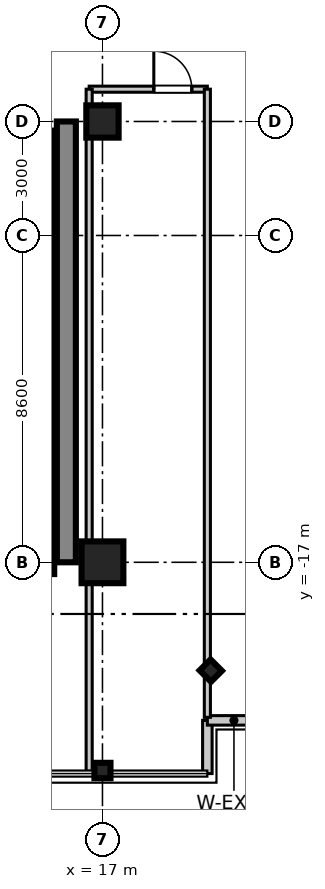
"""IFC4 building model, lengths in metres.
Left out: names, types, materials, properties, quantities, classifications, styles, units other than length and angle.
Written with IfcOpenShell. Run it as: python <this file> out.ifc"""

import sys

from ifc_helpers import new_model, si_unit, direction, frame, frame_2d, origin, origin_2d, place, context, subcontext, project, spatial, rectangle, i_section, extrude, source, transform, mapped, element, fill, save


model = new_model("IFC4")
c1 = context("Model", 3, precision=1e-05, world=origin(), true_north=direction((0.0, 1.0)))
c2 = subcontext(c1, "Body", "Model", "MODEL_VIEW")
j1 = project(units=[si_unit("LENGTHUNIT", "METRE"), si_unit("PLANEANGLEUNIT", "RADIAN")], contexts=[c1])
p1 = place(None, origin())
s1 = spatial("IfcSite", under=j1, at=p1, CompositionType="ELEMENT")
p2 = place(p1, origin())
s2 = spatial("IfcBuilding", under=s1, at=p2, CompositionType="ELEMENT")
p3 = place(p2, frame((0.0, 0.0, 178.2)))
s3 = spatial("IfcBuildingStorey", under=s2, at=p3, CompositionType="ELEMENT", Elevation=178.2)
m1 = source(origin(), c2, "Body", "SweptSolid", [
    extrude(rectangle(XDim=1.1, YDim=1.1, at=origin_2d()), origin(), (0.0, 0.0, 1.0), 3.605),
])
p4 = place(p3, frame((17.0, -17.0, 0.0), z_axis=(0.0, 0.0, 1.0), x_axis=(1.0, 0.0, 0.0)))
e1 = element("IfcColumn", 1, at=p4, inside=s3, PredefinedType="COLUMN", context=c2, shape_type="MappedRepresentation", body=[
    mapped(m1, transform((0.0, 0.0, 0.0), scale=1.0)),
])
m2 = source(origin(), c2, "Body", "SweptSolid", [
    extrude(rectangle(XDim=0.85, YDim=0.85, at=origin_2d()), origin(), (0.0, 0.0, 1.0), 3.605),
])
p5 = place(p3, frame((17.0, -5.4, 0.0), z_axis=(0.0, 0.0, 1.0), x_axis=(1.0, 0.0, 0.0)))
e2 = element("IfcColumn", 2, at=p5, inside=s3, PredefinedType="PILASTER", context=c2, shape_type="MappedRepresentation", body=[
    mapped(m2, transform((0.0, 0.0, 0.0), scale=1.0)),
])
m3 = source(origin(), c2, "Body", "SweptSolid", [
    extrude(i_section(OverallWidth=0.406, OverallDepth=0.422, WebThickness=0.019, FlangeThickness=0.03, at=origin_2d()), origin(), (0.0, 0.0, 1.0), 3.605),
])
for number, where, z_axis, x_axis in (
    (3, (17.0, -22.48, 0.0), (0.0, 0.0, 1.0), (0.0, 1.0, 0.0)),
    (4, (19.85, -19.85, 0.0), (0.0, 0.0, 1.0), (0.707, 0.707, 0.0)),
):
    element("IfcColumn", number, at=place(p3, frame(where, z_axis=z_axis, x_axis=x_axis)), inside=s3, PredefinedType="COLUMN", context=c2, shape_type="MappedRepresentation", body=[
        mapped(m3, transform((0.0, 0.0, 0.0), scale=1.0)),
    ])
m4 = source(origin(), c2, "Body", "SweptSolid", [
    extrude(rectangle(XDim=11.6, YDim=0.5, at=frame_2d((5.8, 0.0))), origin(), (0.0, 0.0, 1.0), 3.39),
])
p6 = place(p3, frame((16.05, -17.0, 0.0), z_axis=(0.0, 0.0, 1.0), x_axis=(0.0, 1.0, 0.0)))
e5 = element("IfcWall", 5, at=p6, inside=s3, PredefinedType="SHEAR", context=c2, shape_type="MappedRepresentation", body=[
    mapped(m4, transform((0.0, 0.0, 0.0), scale=1.0)),
])
m5 = source(origin(), c2, "Body", "SweptSolid", [
    extrude(rectangle(XDim=2.36, YDim=0.22, at=frame_2d((1.18, 0.0))), origin(), (0.0, 0.0, 1.0), 3.39),
])
p7 = place(p3, frame((15.62, -8.0, 0.0), z_axis=(0.0, 0.0, 1.0), x_axis=(0.0, 1.0, 0.0)))
e6 = element("IfcWall", 6, at=p7, inside=s3, PredefinedType="SHEAR", context=c2, shape_type="MappedRepresentation", body=[
    mapped(m5, transform((0.0, 0.0, 0.0), scale=1.0)),
])
m6 = source(origin(), c2, "Body", "SweptSolid", [
    extrude(rectangle(XDim=2.2, YDim=0.22, at=frame_2d((1.1, 0.0))), origin(), (0.0, 0.0, 1.0), 3.39),
])
for number, where, z_axis, x_axis in (
    (7, (15.62, -10.2, 0.0), (0.0, 0.0, 1.0), (0.0, 1.0, 0.0)),
    (8, (15.62, -12.4, 0.0), (0.0, 0.0, 1.0), (0.0, 1.0, 0.0)),
):
    element("IfcWall", number, at=place(p3, frame(where, z_axis=z_axis, x_axis=x_axis)), inside=s3, PredefinedType="SHEAR", context=c2, shape_type="MappedRepresentation", body=[
        mapped(m6, transform((0.0, 0.0, 0.0), scale=1.0)),
    ])
m7 = source(origin(), c2, "Body", "SweptSolid", [
    extrude(rectangle(XDim=2.3, YDim=0.22, at=frame_2d((1.15, 0.0))), origin(), (0.0, 0.0, 1.0), 3.39),
])
p8 = place(p3, frame((15.62, -14.7, 0.0), z_axis=(0.0, 0.0, 1.0), x_axis=(0.0, 1.0, 0.0)))
e9 = element("IfcWall", 9, at=p8, inside=s3, PredefinedType="SHEAR", context=c2, shape_type="MappedRepresentation", body=[
    mapped(m7, transform((0.0, 0.0, 0.0), scale=1.0)),
])
m8 = source(origin(), c2, "Body", "SweptSolid", [
    extrude(rectangle(XDim=2.61, YDim=0.22, at=frame_2d((1.305, 0.0))), origin(), (0.0, 0.0, 1.0), 3.39),
])
p9 = place(p3, frame((15.62, -17.31, 0.0), z_axis=(0.0, 0.0, 1.0), x_axis=(0.0, 1.0, 0.0)))
e10 = element("IfcWall", 10, at=p9, inside=s3, PredefinedType="SHEAR", context=c2, shape_type="MappedRepresentation", body=[
    mapped(m8, transform((0.0, 0.0, 0.0), scale=1.0)),
])
m9 = source(origin(), c2, "Body", "SweptSolid", [
    extrude(rectangle(XDim=1.4, YDim=0.25, at=frame_2d((0.7, 0.0))), origin(), (0.0, 0.0, 1.0), 3.39),
])
p10 = place(p3, frame((19.76, -22.56, 0.0), z_axis=(0.0, 0.0, 1.0), x_axis=(0.0, 1.0, 0.0)))
e11 = element("IfcWall", 11, at=p10, inside=s3, PredefinedType="STANDARD", context=c2, shape_type="MappedRepresentation", body=[
    mapped(m9, transform((0.0, 0.0, 0.0), scale=1.0)),
])
m10 = source(origin(), c2, "Body", "SweptSolid", [
    extrude(rectangle(XDim=1.4, YDim=0.25, at=frame_2d((0.7, 0.0))), origin(), (0.0, 0.0, 1.0), 3.39),
])
p11 = place(p3, frame((19.76, -21.16, 0.0), z_axis=(0.0, 0.0, 1.0), x_axis=(1.0, 0.0, 0.0)))
e12 = element("IfcWall", 12, at=p11, inside=s3, PredefinedType="STANDARD", context=c2, shape_type="MappedRepresentation", body=[
    mapped(m10, transform((0.0, 0.0, 0.0), scale=1.0)),
])
m11 = source(origin(), c2, "Body", "SweptSolid", [
    extrude(rectangle(XDim=3.11, YDim=0.16, at=frame_2d((1.555, 0.0))), origin(), (0.0, 0.0, 1.0), 2.73),
])
p12 = place(p3, frame((16.65, -4.55, 0.0), z_axis=(0.0, 0.0, 1.0), x_axis=(1.0, 0.0, 0.0)))
e13 = element("IfcWall", 13, at=p12, inside=s3, PredefinedType="PARTITIONING", context=c2, shape_type="MappedRepresentation", body=[
    mapped(m11, transform((0.0, 0.0, 0.0), scale=1.0)),
])
p13 = place(p12, frame((1.701, 0.0, 0.0)))
e14 = element("IfcOpeningElement", 14, at=p13, cuts=e13, PredefinedType="OPENING", context=c2, shape_type="SweptSolid", body=[
    extrude(rectangle(XDim=1.0, YDim=2.1, at=frame_2d((0.5, 1.05))), frame((0.0, 0.09, 0.0), z_axis=(0.0, -1.0, 0.0), x_axis=(1.0, 0.0, 0.0)), (0.0, 0.0, 1.0), 0.18),
])
m12 = source(origin(), c2, "Body", "SweptSolid", [
    extrude(rectangle(XDim=17.95, YDim=0.16, at=frame_2d((8.975, 0.0))), origin(), (0.0, 0.0, 1.0), 2.73),
])
p14 = place(p3, frame((16.65, -22.5, 0.0), z_axis=(0.0, 0.0, 1.0), x_axis=(0.0, 1.0, 0.0)))
e15 = element("IfcWall", 15, at=p14, inside=s3, PredefinedType="PARTITIONING", context=c2, shape_type="MappedRepresentation", body=[
    mapped(m12, transform((0.0, 0.0, 0.0), scale=1.0)),
])
m13 = source(origin(), c2, "Body", "SweptSolid", [
    extrude(rectangle(XDim=16.53, YDim=0.16, at=frame_2d((8.265, 0.0))), origin(), (0.0, 0.0, 1.0), 2.73),
])
p15 = place(p3, frame((19.76, -21.08, 0.0), z_axis=(0.0, 0.0, 1.0), x_axis=(0.0, 1.0, 0.0)))
e16 = element("IfcWall", 16, at=p15, inside=s3, PredefinedType="PARTITIONING", context=c2, shape_type="MappedRepresentation", body=[
    mapped(m13, transform((0.0, 0.0, 0.0), scale=1.0)),
])
m14 = source(origin(), c2, "Body", "SweptSolid", [
    extrude(rectangle(XDim=1.0, YDim=2.1, at=frame_2d((0.5, 1.05))), frame((0.0, 0.025, 0.0), z_axis=(0.0, -1.0, 0.0), x_axis=(1.0, 0.0, 0.0)), (0.0, 0.0, 1.0), 0.05),
])
p16 = place(p13, frame((1.0, 0.0, 0.0), z_axis=(0.0, 0.0, 1.0), x_axis=(-1.0, 0.0, 0.0)))
e17 = element("IfcDoor", 17, at=p16, inside=s3, OperationType="SINGLE_SWING_LEFT", PredefinedType="DOOR", context=c2, shape_type="MappedRepresentation", body=[
    mapped(m14, transform((0.0, 0.0, 0.0), scale=1.0)),
])
fill(e14, e17)
save(model, sys.argv[1])
